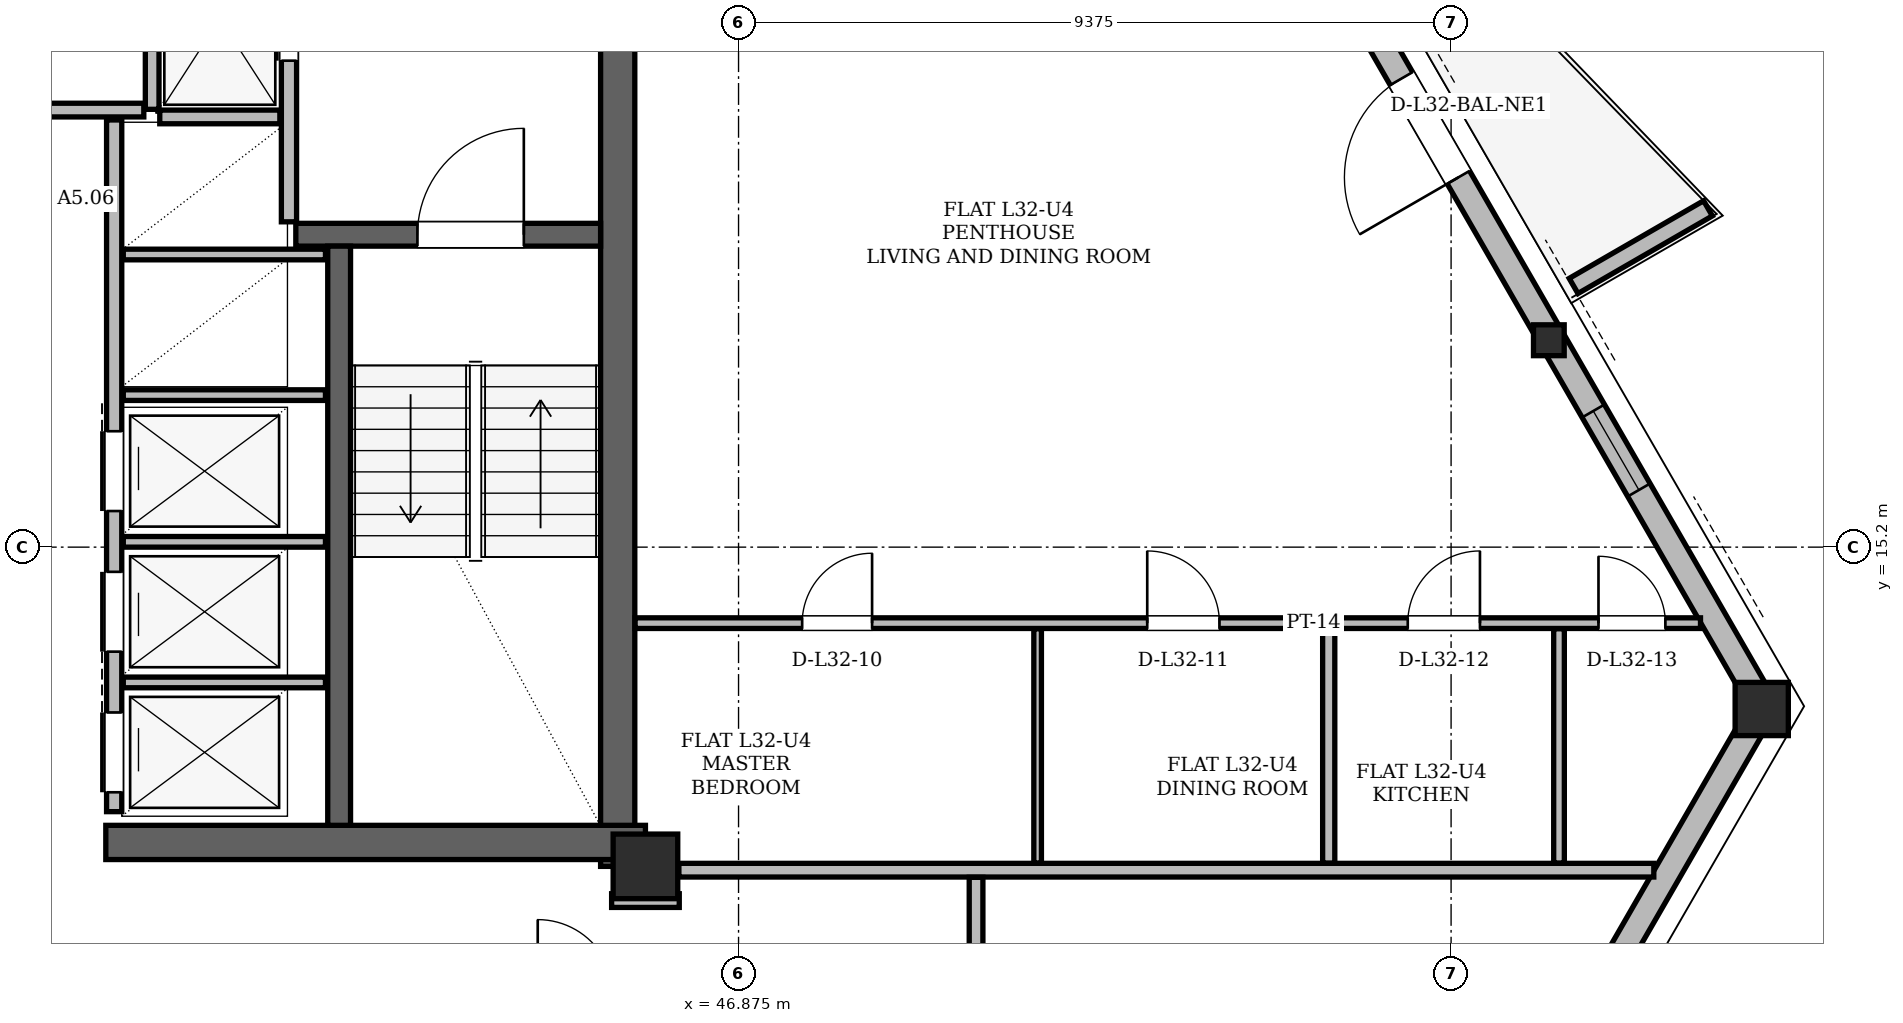
"""IFC4 building model, lengths in metres.
Left out: names, types, materials, properties, quantities, classifications, styles, units other than length and angle.
Written with IfcOpenShell. Run it as: python <this file> out.ifc"""

import sys

from ifc_helpers import new_model, si_unit, direction, frame, frame_2d, origin, origin_2d, place, context, subcontext, project, spatial, polyline, rectangle, hollow_rectangle, i_section, outline, extrude, element, fill, save


model = new_model("IFC4")
c1 = context("Model", 3, precision=1e-05, world=origin(), true_north=direction((0.0, 1.0)))
c2 = subcontext(c1, "Body", "Model", "MODEL_VIEW")
j1 = project(units=[si_unit("LENGTHUNIT", "METRE"), si_unit("PLANEANGLEUNIT", "RADIAN")], contexts=[c1])
p1 = place(None, origin())
s1 = spatial("IfcSite", under=j1, at=p1, CompositionType="ELEMENT")
p2 = place(p1, origin())
s2 = spatial("IfcBuilding", under=s1, at=p2, CompositionType="ELEMENT")
p3 = place(p2, frame((0.0, 0.0, 123.0)))
s3 = spatial("IfcBuildingStorey", under=s2, at=p3, CompositionType="ELEMENT", Elevation=123.0)
p4 = place(p3, frame((45.65, 11.0, 0.0), z_axis=(0.0, 0.0, 1.0), x_axis=(1.0, 0.0, 0.0)))
e1 = element("IfcColumn", 1, at=p4, inside=s3, PredefinedType="COLUMN", context=c2, shape_type="SweptSolid", body=[
    extrude(hollow_rectangle(XDim=0.85, YDim=0.85, WallThickness=0.07, at=origin_2d()), origin(), (0.0, 0.0, 1.0), 3.6),
])
p5 = place(p3, frame((60.364, 13.107, 0.004), z_axis=(-0.014748241412, -0.020253345349, 0.999686096421), x_axis=(0.808384021956, -0.588655479076, 0.0)))
e2 = element("IfcColumn", 2, at=p5, inside=s3, PredefinedType="COLUMN", context=c2, shape_type="SweptSolid", body=[
    extrude(hollow_rectangle(XDim=0.7, YDim=0.7, WallThickness=0.055, at=origin_2d()), origin(), (0.0, 0.0, 1.0), 3.592),
])
p6 = place(p3, frame((57.565, 17.953, 0.004), z_axis=(-0.016379828323, -0.017467285805, 0.999713256464), x_axis=(0.729448684879, -0.684035537182, 0.0)))
e3 = element("IfcColumn", 3, at=p6, inside=s3, PredefinedType="COLUMN", context=c2, shape_type="SweptSolid", body=[
    extrude(i_section(OverallWidth=0.404, OverallDepth=0.406, WebThickness=0.027, FlangeThickness=0.044, at=origin_2d()), origin(), (0.0, 0.0, 1.0), 3.592),
])
p7 = place(p3, frame((45.285, 11.0, 0.0), z_axis=(0.0, 0.0, 1.0), x_axis=(0.0, 1.0, 0.0)))
e4 = element("IfcWall", 4, at=p7, inside=s3, PredefinedType="SHEAR", context=c2, shape_type="SweptSolid", body=[
    extrude(rectangle(XDim=13.3, YDim=0.45, at=frame_2d((6.65, 0.0))), origin(), (0.0, 0.0, 1.0), 3.36),
])
p8 = place(p3, frame((38.55, 11.315, 0.0), z_axis=(0.0, 0.0, 1.0), x_axis=(1.0, 0.0, 0.0)))
e5 = element("IfcWall", 5, at=p8, inside=s3, PredefinedType="SHEAR", context=c2, shape_type="SweptSolid", body=[
    extrude(rectangle(XDim=7.1, YDim=0.45, at=frame_2d((3.55, 0.0))), origin(), (0.0, 0.0, 1.0), 3.36),
])
p9 = place(p3, frame((41.05, 19.31, 0.0), z_axis=(0.0, 0.0, 1.0), x_axis=(1.0, 0.0, 0.0)))
e6 = element("IfcWall", 6, at=p9, inside=s3, PredefinedType="SHEAR", context=c2, shape_type="SweptSolid", body=[
    extrude(rectangle(XDim=4.01, YDim=0.3, at=frame_2d((2.005, 0.0))), origin(), (0.0, 0.0, 1.0), 3.36),
])
p10 = place(p9, frame((1.6, 0.0, 0.0)))
e7 = element("IfcOpeningElement", 7, at=p10, cuts=e6, PredefinedType="OPENING", context=c2, shape_type="SweptSolid", body=[
    extrude(rectangle(XDim=1.4, YDim=2.2, at=frame_2d((0.7, 1.1))), frame((0.0, 0.15, 0.0), z_axis=(0.0, -1.0, 0.0), x_axis=(1.0, 0.0, 0.0)), (0.0, 0.0, 1.0), 0.3),
])
p11 = place(p3, frame((41.62, 11.54, 0.0), z_axis=(0.0, 0.0, 1.0), x_axis=(0.0, 1.0, 0.0)))
e8 = element("IfcWall", 8, at=p11, inside=s3, PredefinedType="SHEAR", context=c2, shape_type="SweptSolid", body=[
    extrude(rectangle(XDim=7.62, YDim=0.3, at=frame_2d((3.81, 0.0))), origin(), (0.0, 0.0, 1.0), 3.36),
])
p12 = place(p3, frame((54.988, 3.796, 0.0), z_axis=(0.0, 0.0, 1.0), x_axis=(0.500010095722, 0.866019574938, 0.0)))
e9 = element("IfcWall", 9, at=p12, inside=s3, PredefinedType="SOLIDWALL", context=c2, shape_type="SweptSolid", body=[
    extrude(rectangle(XDim=10.751, YDim=0.34, at=frame_2d((5.375, 0.0))), origin(), (0.0, 0.0, 1.0), 2.578),
])
p13 = place(p3, frame((60.364, 13.107, 0.0), z_axis=(0.0, 0.0, 1.0), x_axis=(-0.499996370967, 0.866027498997, 0.0)))
e10 = element("IfcWall", 10, at=p13, inside=s3, PredefinedType="SOLIDWALL", context=c2, shape_type="SweptSolid", body=[
    extrude(rectangle(XDim=34.976, YDim=0.34, at=frame_2d((17.488, 0.0))), origin(), (0.0, 0.0, 1.0), 2.578),
])
p14 = place(p13, frame((8.034, 0.0, 0.0)))
e11 = element("IfcOpeningElement", 11, at=p14, cuts=e10, PredefinedType="OPENING", context=c2, shape_type="SweptSolid", body=[
    extrude(rectangle(XDim=1.5, YDim=2.2, at=frame_2d((0.75, 1.1))), frame((0.0, 0.17, 0.0), z_axis=(0.0, -1.0, 0.0), x_axis=(1.0, 0.0, 0.0)), (0.0, 0.0, 1.0), 0.34),
])
p15 = place(p13, frame((27.106, 0.0, 0.0)))
e12 = element("IfcOpeningElement", 12, at=p15, cuts=e10, PredefinedType="OPENING", context=c2, shape_type="SweptSolid", body=[
    extrude(rectangle(XDim=1.5, YDim=2.2, at=frame_2d((0.75, 1.1))), frame((0.0, 0.17, 0.0), z_axis=(0.0, -1.0, 0.0), x_axis=(1.0, 0.0, 0.0)), (0.0, 0.0, 1.0), 0.34),
])
p16 = place(p13, frame((3.285, 0.0, 0.85)))
e13 = element("IfcOpeningElement", 13, at=p16, cuts=e10, PredefinedType="OPENING", context=c2, shape_type="SweptSolid", body=[
    extrude(rectangle(XDim=1.2, YDim=1.48, at=frame_2d((0.6, 0.74))), frame((0.0, 0.17, 0.0), z_axis=(0.0, -1.0, 0.0), x_axis=(1.0, 0.0, 0.0)), (0.0, 0.0, 1.0), 0.34),
])
p17 = place(p13, frame((11.406, 0.0, 0.85)))
e14 = element("IfcOpeningElement", 14, at=p17, cuts=e10, PredefinedType="OPENING", context=c2, shape_type="SweptSolid", body=[
    extrude(rectangle(XDim=1.2, YDim=1.48, at=frame_2d((0.6, 0.74))), frame((0.0, 0.17, 0.0), z_axis=(0.0, -1.0, 0.0), x_axis=(1.0, 0.0, 0.0)), (0.0, 0.0, 1.0), 0.34),
])
p18 = place(p13, frame((31.066, 0.0, 0.85)))
e15 = element("IfcOpeningElement", 15, at=p18, cuts=e10, PredefinedType="OPENING", context=c2, shape_type="SweptSolid", body=[
    extrude(rectangle(XDim=2.2, YDim=1.618, at=frame_2d((1.1, 0.809))), frame((0.0, 0.17, 0.0), z_axis=(0.0, -1.0, 0.0), x_axis=(1.0, 0.0, 0.0)), (0.0, 0.0, 1.0), 0.34),
])
p19 = place(p13, frame((14.149, 0.0, 0.85)))
e16 = element("IfcOpeningElement", 16, at=p19, cuts=e10, PredefinedType="OPENING", context=c2, shape_type="SweptSolid", body=[
    extrude(rectangle(XDim=2.6, YDim=1.618, at=frame_2d((1.3, 0.809))), frame((0.0, 0.17, 0.0), z_axis=(0.0, -1.0, 0.0), x_axis=(1.0, 0.0, 0.0)), (0.0, 0.0, 1.0), 0.34),
])
p20 = place(p13, frame((18.924, 0.0, 0.85)))
e17 = element("IfcOpeningElement", 17, at=p20, cuts=e10, PredefinedType="OPENING", context=c2, shape_type="SweptSolid", body=[
    extrude(rectangle(XDim=2.0, YDim=1.618, at=frame_2d((1.0, 0.809))), frame((0.0, 0.17, 0.0), z_axis=(0.0, -1.0, 0.0), x_axis=(1.0, 0.0, 0.0)), (0.0, 0.0, 1.0), 0.34),
])
p21 = place(p3, frame((57.862, 18.636, 0.0), z_axis=(0.0, 0.0, 1.0), x_axis=(0.866012356593, 0.500022597718, 0.0)))
e18 = element("IfcWall", 18, at=p21, inside=s3, PredefinedType="PARAPET", context=c2, shape_type="SweptSolid", body=[
    extrude(outline(polyline([(0.0, 0.0), (2.042, 0.0), (2.042, 1.1), (0.0, 1.32), (0.0, 0.0)])), frame((0.0, 0.115, 0.0), z_axis=(0.0, -1.0, 0.0), x_axis=(1.0, 0.0, 0.0)), (0.0, 0.0, 1.0), 0.23),
])
p22 = place(p3, frame((40.96, 19.48, 0.0), z_axis=(0.0, 0.0, 1.0), x_axis=(0.0, 1.0, 0.0)))
e19 = element("IfcWall", 19, at=p22, inside=s3, PredefinedType="PARTITIONING", context=c2, shape_type="SweptSolid", body=[
    extrude(rectangle(XDim=4.5, YDim=0.2, at=frame_2d((2.25, 0.0))), origin(), (0.0, 0.0, 1.0), 2.4),
])
p23 = place(p22, frame((2.12, 0.0, 0.0)))
e20 = element("IfcOpeningElement", 20, at=p23, cuts=e19, PredefinedType="OPENING", context=c2, shape_type="SweptSolid", body=[
    extrude(rectangle(XDim=1.1, YDim=2.2, at=frame_2d((0.55, 1.1))), frame((0.0, 0.1, 0.0), z_axis=(0.0, -1.0, 0.0), x_axis=(1.0, 0.0, 0.0)), (0.0, 0.0, 1.0), 0.2),
])
p24 = place(p3, frame((39.16, 20.96, 0.0), z_axis=(0.0, 0.0, 1.0), x_axis=(0.0, 1.0, 0.0)))
e21 = element("IfcWall", 21, at=p24, inside=s3, PredefinedType="PARTITIONING", context=c2, shape_type="SweptSolid", body=[
    extrude(rectangle(XDim=3.02, YDim=0.18, at=frame_2d((1.51, 0.0))), origin(), (0.0, 0.0, 1.0), 2.4),
])
p25 = place(p3, frame((39.26, 20.86, 0.0), z_axis=(0.0, 0.0, 1.0), x_axis=(1.0, 0.0, 0.0)))
e22 = element("IfcWall", 22, at=p25, inside=s3, PredefinedType="PARTITIONING", context=c2, shape_type="SweptSolid", body=[
    extrude(rectangle(XDim=1.58, YDim=0.18, at=frame_2d((0.79, 0.0))), origin(), (0.0, 0.0, 1.0), 3.36),
])
p26 = place(p3, frame((38.66, 11.72, 0.0), z_axis=(0.0, 0.0, 1.0), x_axis=(0.0, 1.0, 0.0)))
e23 = element("IfcWall", 23, at=p26, inside=s3, PredefinedType="PARTITIONING", context=c2, shape_type="SweptSolid", body=[
    extrude(rectangle(XDim=9.1, YDim=0.2, at=frame_2d((4.55, 0.0))), origin(), (0.0, 0.0, 1.0), 3.36),
])
p27 = place(p26, frame((0.255, 0.0, 0.0)))
e24 = element("IfcOpeningElement", 24, at=p27, cuts=e23, PredefinedType="OPENING", context=c2, shape_type="SweptSolid", body=[
    extrude(rectangle(XDim=1.05, YDim=2.15, at=frame_2d((0.525, 1.075))), frame((0.0, 0.1, 0.0), z_axis=(0.0, -1.0, 0.0), x_axis=(1.0, 0.0, 0.0)), (0.0, 0.0, 1.0), 0.2),
])
p28 = place(p26, frame((2.105, 0.0, 0.0)))
e25 = element("IfcOpeningElement", 25, at=p28, cuts=e23, PredefinedType="OPENING", context=c2, shape_type="SweptSolid", body=[
    extrude(rectangle(XDim=1.05, YDim=2.15, at=frame_2d((0.525, 1.075))), frame((0.0, 0.1, 0.0), z_axis=(0.0, -1.0, 0.0), x_axis=(1.0, 0.0, 0.0)), (0.0, 0.0, 1.0), 0.2),
])
p29 = place(p26, frame((3.955, 0.0, 0.0)))
e26 = element("IfcOpeningElement", 26, at=p29, cuts=e23, PredefinedType="OPENING", context=c2, shape_type="SweptSolid", body=[
    extrude(rectangle(XDim=1.05, YDim=2.15, at=frame_2d((0.525, 1.075))), frame((0.0, 0.1, 0.0), z_axis=(0.0, -1.0, 0.0), x_axis=(1.0, 0.0, 0.0)), (0.0, 0.0, 1.0), 0.2),
])
for number, where, z_axis, x_axis in (
    (27, (38.78, 13.42, 0.0), (0.0, 0.0, 1.0), (1.0, 0.0, 0.0)),
    (28, (38.78, 15.27, 0.0), (0.0, 0.0, 1.0), (1.0, 0.0, 0.0)),
    (29, (38.78, 17.2, 0.0), (0.0, 0.0, 1.0), (1.0, 0.0, 0.0)),
    (30, (38.78, 19.05, 0.0), (0.0, 0.0, 1.0), (1.0, 0.0, 0.0)),
):
    element("IfcWall", number, at=place(p3, frame(where, z_axis=z_axis, x_axis=x_axis)), inside=s3, PredefinedType="PARTITIONING", context=c2, shape_type="SweptSolid", body=[
        extrude(rectangle(XDim=2.66, YDim=0.14, at=frame_2d((1.33, 0.0))), origin(), (0.0, 0.0, 1.0), 3.36),
    ])
p30 = place(p3, frame((35.95, 20.95, 0.0), z_axis=(0.0, 0.0, 1.0), x_axis=(1.0, 0.0, 0.0)))
e31 = element("IfcWall", 31, at=p30, inside=s3, PredefinedType="PARTITIONING", context=c2, shape_type="SweptSolid", body=[
    extrude(rectangle(XDim=3.1, YDim=0.18, at=frame_2d((1.55, 0.0))), origin(), (0.0, 0.0, 1.0), 3.36),
])
p31 = place(p3, frame((45.205, 10.55, 0.0), z_axis=(0.0, 0.0, 1.0), x_axis=(1.0, 0.0, 0.0)))
e32 = element("IfcWall", 32, at=p31, inside=s3, PredefinedType="PARTITIONING", context=c2, shape_type="SweptSolid", body=[
    extrude(rectangle(XDim=0.89, YDim=0.18, at=frame_2d((0.445, 0.0))), origin(), (0.0, 0.0, 1.0), 3.36),
])
p32 = place(p3, frame((46.09, 10.95, 0.0), z_axis=(0.0, 0.0, 1.0), x_axis=(1.0, 0.0, 0.0)))
e33 = element("IfcWall", 33, at=p32, inside=s3, PredefinedType="PARTITIONING", context=c2, shape_type="SweptSolid", body=[
    extrude(rectangle(XDim=12.827, YDim=0.18, at=frame_2d((6.414, 0.0))), origin(), (0.0, 0.0, 1.0), 2.814),
])
p33 = place(p3, frame((45.514, 14.2, 0.0), z_axis=(0.0, 0.0, 1.0), x_axis=(1.0, 0.0, 0.0)))
e34 = element("IfcWall", 34, at=p33, inside=s3, PredefinedType="PARTITIONING", context=c2, shape_type="SweptSolid", body=[
    extrude(rectangle(XDim=14.018, YDim=0.14, at=frame_2d((7.009, 0.0))), origin(), (0.0, 0.0, 1.0), 2.4),
])
p34 = place(p33, frame((2.198, 0.0, 0.0)))
e35 = element("IfcOpeningElement", 35, at=p34, cuts=e34, PredefinedType="OPENING", context=c2, shape_type="SweptSolid", body=[
    extrude(rectangle(XDim=0.92, YDim=2.12, at=frame_2d((0.46, 1.06))), frame((0.0, 0.07, 0.0), z_axis=(0.0, -1.0, 0.0), x_axis=(1.0, 0.0, 0.0)), (0.0, 0.0, 1.0), 0.14),
])
p35 = place(p33, frame((6.738, 0.0, 0.0)))
e36 = element("IfcOpeningElement", 36, at=p35, cuts=e34, PredefinedType="OPENING", context=c2, shape_type="SweptSolid", body=[
    extrude(rectangle(XDim=0.95, YDim=2.1, at=frame_2d((0.475, 1.05))), frame((0.0, 0.07, 0.0), z_axis=(0.0, -1.0, 0.0), x_axis=(1.0, 0.0, 0.0)), (0.0, 0.0, 1.0), 0.14),
])
p36 = place(p33, frame((10.166, 0.0, 0.0)))
e37 = element("IfcOpeningElement", 37, at=p36, cuts=e34, PredefinedType="OPENING", context=c2, shape_type="SweptSolid", body=[
    extrude(rectangle(XDim=0.95, YDim=2.1, at=frame_2d((0.475, 1.05))), frame((0.0, 0.07, 0.0), z_axis=(0.0, -1.0, 0.0), x_axis=(1.0, 0.0, 0.0)), (0.0, 0.0, 1.0), 0.14),
])
p37 = place(p33, frame((12.675, 0.0, 0.0)))
e38 = element("IfcOpeningElement", 38, at=p37, cuts=e34, PredefinedType="OPENING", context=c2, shape_type="SweptSolid", body=[
    extrude(rectangle(XDim=0.88, YDim=2.08, at=frame_2d((0.44, 1.04))), frame((0.0, 0.07, 0.0), z_axis=(0.0, -1.0, 0.0), x_axis=(1.0, 0.0, 0.0)), (0.0, 0.0, 1.0), 0.14),
])
p38 = place(p3, frame((50.0, 9.394, 0.0), z_axis=(0.0, 0.0, 1.0), x_axis=(0.0, 1.0, 0.0)))
e39 = element("IfcWall", 39, at=p38, inside=s3, PredefinedType="PARTITIONING", context=c2, shape_type="SweptSolid", body=[
    extrude(rectangle(XDim=1.462, YDim=0.18, at=frame_2d((0.731, 0.0))), origin(), (0.0, 0.0, 1.0), 3.36),
])
p39 = place(p3, frame((50.81, 11.044, 0.0), z_axis=(0.0, 0.0, 1.0), x_axis=(0.0, 1.0, 0.0)))
e40 = element("IfcWall", 40, at=p39, inside=s3, PredefinedType="PARTITIONING", context=c2, shape_type="SweptSolid", body=[
    extrude(rectangle(XDim=3.082, YDim=0.1, at=frame_2d((1.541, 0.0))), origin(), (0.0, 0.0, 1.0), 2.814),
])
p40 = place(p3, frame((54.64, 11.044, 0.0), z_axis=(0.0, 0.0, 1.0), x_axis=(0.0, 1.0, 0.0)))
e41 = element("IfcWall", 41, at=p40, inside=s3, PredefinedType="PARTITIONING", context=c2, shape_type="SweptSolid", body=[
    extrude(rectangle(XDim=3.082, YDim=0.16, at=frame_2d((1.541, 0.0))), origin(), (0.0, 0.0, 1.0), 2.814),
])
p41 = place(p3, frame((57.67, 11.044, 0.0), z_axis=(0.0, 0.0, 1.0), x_axis=(0.0, 1.0, 0.0)))
e42 = element("IfcWall", 42, at=p41, inside=s3, PredefinedType="PARTITIONING", context=c2, shape_type="SweptSolid", body=[
    extrude(rectangle(XDim=3.082, YDim=0.14, at=frame_2d((1.541, 0.0))), origin(), (0.0, 0.0, 1.0), 2.814),
])
p42 = place(p14, origin())
e43 = element("IfcDoor", 43, at=p42, inside=s3, OperationType="SINGLE_SWING_LEFT", PredefinedType="DOOR", context=c2, shape_type="SweptSolid", body=[
    extrude(rectangle(XDim=1.5, YDim=2.2, at=frame_2d((0.75, 1.1))), frame((0.0, 0.025, 0.0), z_axis=(0.0, -1.0, 0.0), x_axis=(1.0, 0.0, 0.0)), (0.0, 0.0, 1.0), 0.05),
])
fill(e11, e43)
p43 = place(p16, origin())
e44 = element("IfcWindow", 44, at=p43, inside=s3, PartitioningType="SINGLE_PANEL", PredefinedType="WINDOW", context=c2, shape_type="SweptSolid", body=[
    extrude(rectangle(XDim=1.2, YDim=1.48, at=frame_2d((0.6, 0.74))), frame((0.0, 0.03, 0.0), z_axis=(0.0, -1.0, 0.0), x_axis=(1.0, 0.0, 0.0)), (0.0, 0.0, 1.0), 0.06),
])
fill(e13, e44)
p44 = place(p23, origin())
e45 = element("IfcDoor", 45, at=p44, inside=s3, OperationType="SLIDING_TO_RIGHT", PredefinedType="DOOR", context=c2, shape_type="SweptSolid", body=[
    extrude(rectangle(XDim=1.1, YDim=2.2, at=frame_2d((0.55, 1.1))), frame((0.0, 0.025, 0.0), z_axis=(0.0, -1.0, 0.0), x_axis=(1.0, 0.0, 0.0)), (0.0, 0.0, 1.0), 0.05),
])
fill(e20, e45)
p45 = place(p27, origin())
e46 = element("IfcDoor", 46, at=p45, inside=s3, OperationType="SLIDING_TO_RIGHT", PredefinedType="DOOR", context=c2, shape_type="SweptSolid", body=[
    extrude(rectangle(XDim=1.05, YDim=2.15, at=frame_2d((0.525, 1.075))), frame((0.0, 0.025, 0.0), z_axis=(0.0, -1.0, 0.0), x_axis=(1.0, 0.0, 0.0)), (0.0, 0.0, 1.0), 0.05),
])
fill(e24, e46)
p46 = place(p28, origin())
e47 = element("IfcDoor", 47, at=p46, inside=s3, OperationType="SLIDING_TO_LEFT", PredefinedType="DOOR", context=c2, shape_type="SweptSolid", body=[
    extrude(rectangle(XDim=1.05, YDim=2.15, at=frame_2d((0.525, 1.075))), frame((0.0, 0.025, 0.0), z_axis=(0.0, -1.0, 0.0), x_axis=(1.0, 0.0, 0.0)), (0.0, 0.0, 1.0), 0.05),
])
fill(e25, e47)
p47 = place(p29, origin())
e48 = element("IfcDoor", 48, at=p47, inside=s3, OperationType="SLIDING_TO_RIGHT", PredefinedType="DOOR", context=c2, shape_type="SweptSolid", body=[
    extrude(rectangle(XDim=1.05, YDim=2.15, at=frame_2d((0.525, 1.075))), frame((0.0, 0.025, 0.0), z_axis=(0.0, -1.0, 0.0), x_axis=(1.0, 0.0, 0.0)), (0.0, 0.0, 1.0), 0.05),
])
fill(e26, e48)
p48 = place(p10, origin())
e49 = element("IfcDoor", 49, at=p48, inside=s3, OperationType="SINGLE_SWING_RIGHT", PredefinedType="DOOR", context=c2, shape_type="SweptSolid", body=[
    extrude(rectangle(XDim=1.4, YDim=2.2, at=frame_2d((0.7, 1.1))), frame((0.0, 0.025, 0.0), z_axis=(0.0, -1.0, 0.0), x_axis=(1.0, 0.0, 0.0)), (0.0, 0.0, 1.0), 0.05),
])
fill(e7, e49)
p49 = place(p34, origin())
e50 = element("IfcDoor", 50, at=p49, inside=s3, OperationType="SINGLE_SWING_RIGHT", PredefinedType="DOOR", context=c2, shape_type="SweptSolid", body=[
    extrude(rectangle(XDim=0.92, YDim=2.12, at=frame_2d((0.46, 1.06))), frame((0.0, 0.025, 0.0), z_axis=(0.0, -1.0, 0.0), x_axis=(1.0, 0.0, 0.0)), (0.0, 0.0, 1.0), 0.05),
])
fill(e35, e50)
p50 = place(p35, origin())
e51 = element("IfcDoor", 51, at=p50, inside=s3, OperationType="SINGLE_SWING_LEFT", PredefinedType="DOOR", context=c2, shape_type="SweptSolid", body=[
    extrude(rectangle(XDim=0.95, YDim=2.1, at=frame_2d((0.475, 1.05))), frame((0.0, 0.025, 0.0), z_axis=(0.0, -1.0, 0.0), x_axis=(1.0, 0.0, 0.0)), (0.0, 0.0, 1.0), 0.05),
])
fill(e36, e51)
p51 = place(p36, origin())
e52 = element("IfcDoor", 52, at=p51, inside=s3, OperationType="SINGLE_SWING_RIGHT", PredefinedType="DOOR", context=c2, shape_type="SweptSolid", body=[
    extrude(rectangle(XDim=0.95, YDim=2.1, at=frame_2d((0.475, 1.05))), frame((0.0, 0.025, 0.0), z_axis=(0.0, -1.0, 0.0), x_axis=(1.0, 0.0, 0.0)), (0.0, 0.0, 1.0), 0.05),
])
fill(e37, e52)
p52 = place(p37, origin())
e53 = element("IfcDoor", 53, at=p52, inside=s3, OperationType="SINGLE_SWING_LEFT", PredefinedType="DOOR", context=c2, shape_type="SweptSolid", body=[
    extrude(rectangle(XDim=0.88, YDim=2.08, at=frame_2d((0.44, 1.04))), frame((0.0, 0.025, 0.0), z_axis=(0.0, -1.0, 0.0), x_axis=(1.0, 0.0, 0.0)), (0.0, 0.0, 1.0), 0.05),
])
fill(e38, e53)
save(model, sys.argv[1])
